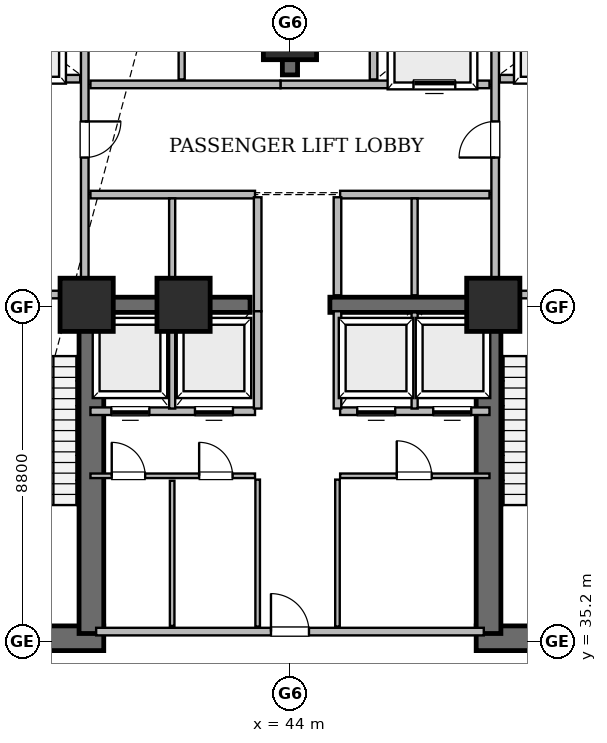
"""IFC4 building model, lengths in metres.
Left out: names, types, materials, properties, quantities, classifications, styles, units other than length and angle.
Written with IfcOpenShell. Run it as: python <this file> out.ifc"""

import sys

from ifc_helpers import new_model, si_unit, direction, frame, frame_2d, origin, origin_2d, place, context, subcontext, project, spatial, rectangle, extrude, element, fill, save


model = new_model("IFC4")
c1 = context("Model", 3, precision=1e-05, world=origin(), true_north=direction((0.0, 1.0)))
c2 = subcontext(c1, "Body", "Model", "MODEL_VIEW")
j1 = project(units=[si_unit("LENGTHUNIT", "METRE"), si_unit("PLANEANGLEUNIT", "RADIAN")], contexts=[c1])
p1 = place(None, origin())
s1 = spatial("IfcSite", under=j1, at=p1, CompositionType="ELEMENT")
p2 = place(p1, origin())
s2 = spatial("IfcBuilding", under=s1, at=p2, CompositionType="ELEMENT")
p3 = place(p2, frame((0.0, 0.0, 24.0)))
s3 = spatial("IfcBuildingStorey", under=s2, at=p3, CompositionType="ELEMENT", Elevation=24.0)
for number, where, z_axis, x_axis in (
    (1, (34.95, 35.275, 0.0), (0.0, 0.0, 1.0), (1.0, 0.0, 0.0)),
    (2, (48.9, 35.275, 0.0), (0.0, 0.0, 1.0), (1.0, 0.0, 0.0)),
):
    element("IfcWall", number, at=place(p3, frame(where, z_axis=z_axis, x_axis=x_axis)), inside=s3, PredefinedType="SHEAR", context=c2, shape_type="SweptSolid", body=[
        extrude(rectangle(XDim=4.15, YDim=0.65, at=frame_2d((2.075, 0.0))), origin(), (0.0, 0.0, 1.0), 4.925),
    ])
for number, where, z_axis, x_axis in (
    (3, (38.775, 35.4, 0.0), (0.0, 0.0, 1.0), (0.0, 1.0, 0.0)),
    (4, (49.225, 35.4, 0.0), (0.0, 0.0, 1.0), (0.0, 1.0, 0.0)),
):
    element("IfcWall", number, at=place(p3, frame(where, z_axis=z_axis, x_axis=x_axis)), inside=s3, PredefinedType="SHEAR", context=c2, shape_type="SweptSolid", body=[
        extrude(rectangle(XDim=8.95, YDim=0.65, at=frame_2d((4.475, 0.0))), origin(), (0.0, 0.0, 1.0), 4.925),
    ])
p4 = place(p3, frame((44.0, 50.1, 0.0), z_axis=(0.0, 0.0, 1.0), x_axis=(0.0, 1.0, 0.0)))
e5 = element("IfcWall", 5, at=p4, inside=s3, PredefinedType="SHEAR", context=c2, shape_type="SweptSolid", body=[
    extrude(rectangle(XDim=2.1, YDim=0.4, at=frame_2d((1.05, 0.0))), origin(), (0.0, 0.0, 1.0), 4.925),
])
for number, where, z_axis, x_axis in (
    (6, (38.75, 44.05, 0.0), (0.0, 0.0, 1.0), (1.0, 0.0, 0.0)),
    (7, (45.05, 44.05, 0.0), (0.0, 0.0, 1.0), (1.0, 0.0, 0.0)),
):
    element("IfcWall", number, at=place(p3, frame(where, z_axis=z_axis, x_axis=x_axis)), inside=s3, PredefinedType="SHEAR", context=c2, shape_type="SweptSolid", body=[
        extrude(rectangle(XDim=4.2, YDim=0.4, at=frame_2d((2.1, 0.0))), origin(), (0.0, 0.0, 1.0), 4.925),
    ])
for number, where, z_axis, x_axis in (
    (8, (38.65, 44.05, 0.0), (0.0, 0.0, 1.0), (1.0, 0.0, 0.0)),
    (9, (49.35, 44.05, 0.0), (0.0, 0.0, 1.0), (1.0, 0.0, 0.0)),
    (10, (44.0, 51.2, 0.0), (0.0, 0.0, 1.0), (1.0, 0.0, 0.0)),
    (11, (41.2, 44.05, 0.0), (0.0, 0.0, 1.0), (1.0, 0.0, 0.0)),
):
    element("IfcColumn", number, at=place(p3, frame(where, z_axis=z_axis, x_axis=x_axis)), inside=s3, PredefinedType="COLUMN", context=c2, shape_type="SweptSolid", body=[
        extrude(rectangle(XDim=1.4, YDim=1.4, at=origin_2d()), origin(), (0.0, 0.0, 1.0), 5.2),
    ])
p5 = place(p3, frame((38.9, 35.45, 0.0), z_axis=(0.0, 0.0, 1.0), x_axis=(1.0, 0.0, 0.0)))
e12 = element("IfcWall", 12, at=p5, inside=s3, PredefinedType="SOLIDWALL", context=c2, shape_type="SweptSolid", body=[
    extrude(rectangle(XDim=10.2, YDim=0.2, at=frame_2d((5.1, 0.0))), origin(), (0.0, 0.0, 1.0), 4.925),
])
p6 = place(p5, frame((4.6, 0.0, 0.0)))
e13 = element("IfcOpeningElement", 13, at=p6, cuts=e12, PredefinedType="OPENING", context=c2, shape_type="SweptSolid", body=[
    extrude(rectangle(XDim=1.0, YDim=2.15, at=frame_2d((0.5, 1.075))), frame((0.0, 0.11, 0.0), z_axis=(0.0, -1.0, 0.0), x_axis=(1.0, 0.0, 0.0)), (0.0, 0.0, 1.0), 0.22),
])
p7 = place(p3, frame((38.6, 44.5, 0.0), z_axis=(0.0, 0.0, 1.0), x_axis=(0.0, 1.0, 0.0)))
e14 = element("IfcWall", 14, at=p7, inside=s3, PredefinedType="SOLIDWALL", context=c2, shape_type="SweptSolid", body=[
    extrude(rectangle(XDim=7.92, YDim=0.2, at=frame_2d((3.96, 0.0))), origin(), (0.0, 0.0, 1.0), 4.925),
])
p8 = place(p7, frame((3.425, 0.0, 0.0)))
e15 = element("IfcOpeningElement", 15, at=p8, cuts=e14, PredefinedType="OPENING", context=c2, shape_type="SweptSolid", body=[
    extrude(rectangle(XDim=0.95, YDim=2.15, at=frame_2d((0.475, 1.075))), frame((0.0, 0.11, 0.0), z_axis=(0.0, -1.0, 0.0), x_axis=(1.0, 0.0, 0.0)), (0.0, 0.0, 1.0), 0.22),
])
p9 = place(p3, frame((49.4, 44.5, 0.0), z_axis=(0.0, 0.0, 1.0), x_axis=(0.0, 1.0, 0.0)))
e16 = element("IfcWall", 16, at=p9, inside=s3, PredefinedType="SOLIDWALL", context=c2, shape_type="SweptSolid", body=[
    extrude(rectangle(XDim=7.92, YDim=0.2, at=frame_2d((3.96, 0.0))), origin(), (0.0, 0.0, 1.0), 4.013),
])
p10 = place(p9, frame((3.425, 0.0, 0.0)))
e17 = element("IfcOpeningElement", 17, at=p10, cuts=e16, PredefinedType="OPENING", context=c2, shape_type="SweptSolid", body=[
    extrude(rectangle(XDim=0.95, YDim=2.15, at=frame_2d((0.475, 1.075))), frame((0.0, 0.11, 0.0), z_axis=(0.0, -1.0, 0.0), x_axis=(1.0, 0.0, 0.0)), (0.0, 0.0, 1.0), 0.22),
])
p11 = place(p3, frame((43.75, 49.85, 0.0), z_axis=(0.0, 0.0, 1.0), x_axis=(1.0, 0.0, 0.0)))
e18 = element("IfcWall", 18, at=p11, inside=s3, PredefinedType="SOLIDWALL", context=c2, shape_type="SweptSolid", body=[
    extrude(rectangle(XDim=5.5, YDim=0.2, at=frame_2d((2.75, 0.0))), origin(), (0.0, 0.0, 1.0), 4.013),
])
p12 = place(p11, frame((3.5, 0.0, 0.0)))
e19 = element("IfcOpeningElement", 19, at=p12, cuts=e18, PredefinedType="OPENING", context=c2, shape_type="SweptSolid", body=[
    extrude(rectangle(XDim=1.1, YDim=2.15, at=frame_2d((0.55, 1.075))), frame((0.0, 0.11, 0.0), z_axis=(0.0, -1.0, 0.0), x_axis=(1.0, 0.0, 0.0)), (0.0, 0.0, 1.0), 0.22),
])
p13 = place(p3, frame((38.75, 41.25, 0.0), z_axis=(0.0, 0.0, 1.0), x_axis=(1.0, 0.0, 0.0)))
e20 = element("IfcWall", 20, at=p13, inside=s3, PredefinedType="SOLIDWALL", context=c2, shape_type="SweptSolid", body=[
    extrude(rectangle(XDim=4.33, YDim=0.2, at=frame_2d((2.165, 0.0))), origin(), (0.0, 0.0, 1.0), 4.925),
])
p14 = place(p13, frame((0.55, 0.0, 0.0)))
e21 = element("IfcOpeningElement", 21, at=p14, cuts=e20, PredefinedType="OPENING", context=c2, shape_type="SweptSolid", body=[
    extrude(rectangle(XDim=1.0, YDim=2.15, at=frame_2d((0.5, 1.075))), frame((0.0, 0.11, 0.0), z_axis=(0.0, -1.0, 0.0), x_axis=(1.0, 0.0, 0.0)), (0.0, 0.0, 1.0), 0.22),
])
p15 = place(p13, frame((2.75, 0.0, 0.0)))
e22 = element("IfcOpeningElement", 22, at=p15, cuts=e20, PredefinedType="OPENING", context=c2, shape_type="SweptSolid", body=[
    extrude(rectangle(XDim=1.0, YDim=2.15, at=frame_2d((0.5, 1.075))), frame((0.0, 0.11, 0.0), z_axis=(0.0, -1.0, 0.0), x_axis=(1.0, 0.0, 0.0)), (0.0, 0.0, 1.0), 0.22),
])
p16 = place(p3, frame((38.75, 39.55, 0.0), z_axis=(0.0, 0.0, 1.0), x_axis=(1.0, 0.0, 0.0)))
e23 = element("IfcWall", 23, at=p16, inside=s3, PredefinedType="PARTITIONING", context=c2, shape_type="SweptSolid", body=[
    extrude(rectangle(XDim=4.33, YDim=0.12, at=frame_2d((2.165, 0.0))), origin(), (0.0, 0.0, 1.0), 4.925),
])
p17 = place(p16, frame((0.56, 0.0, 0.0)))
e24 = element("IfcOpeningElement", 24, at=p17, cuts=e23, PredefinedType="OPENING", context=c2, shape_type="SweptSolid", body=[
    extrude(rectangle(XDim=0.88, YDim=2.1, at=frame_2d((0.44, 1.05))), frame((0.0, 0.07, 0.0), z_axis=(0.0, -1.0, 0.0), x_axis=(1.0, 0.0, 0.0)), (0.0, 0.0, 1.0), 0.14),
])
p18 = place(p16, frame((2.86, 0.0, 0.0)))
e25 = element("IfcOpeningElement", 25, at=p18, cuts=e23, PredefinedType="OPENING", context=c2, shape_type="SweptSolid", body=[
    extrude(rectangle(XDim=0.88, YDim=2.1, at=frame_2d((0.44, 1.05))), frame((0.0, 0.07, 0.0), z_axis=(0.0, -1.0, 0.0), x_axis=(1.0, 0.0, 0.0)), (0.0, 0.0, 1.0), 0.14),
])
p19 = place(p3, frame((45.32, 41.25, 0.0), z_axis=(0.0, 0.0, 1.0), x_axis=(1.0, 0.0, 0.0)))
e26 = element("IfcWall", 26, at=p19, inside=s3, PredefinedType="SOLIDWALL", context=c2, shape_type="SweptSolid", body=[
    extrude(rectangle(XDim=3.93, YDim=0.2, at=frame_2d((1.965, 0.0))), origin(), (0.0, 0.0, 1.0), 4.925),
])
p20 = place(p19, frame((0.45, 0.0, 0.0)))
e27 = element("IfcOpeningElement", 27, at=p20, cuts=e26, PredefinedType="OPENING", context=c2, shape_type="SweptSolid", body=[
    extrude(rectangle(XDim=1.0, YDim=2.15, at=frame_2d((0.5, 1.075))), frame((0.0, 0.11, 0.0), z_axis=(0.0, -1.0, 0.0), x_axis=(1.0, 0.0, 0.0)), (0.0, 0.0, 1.0), 0.22),
])
p21 = place(p19, frame((2.45, 0.0, 0.0)))
e28 = element("IfcOpeningElement", 28, at=p21, cuts=e26, PredefinedType="OPENING", context=c2, shape_type="SweptSolid", body=[
    extrude(rectangle(XDim=1.0, YDim=2.15, at=frame_2d((0.5, 1.075))), frame((0.0, 0.11, 0.0), z_axis=(0.0, -1.0, 0.0), x_axis=(1.0, 0.0, 0.0)), (0.0, 0.0, 1.0), 0.22),
])
p22 = place(p3, frame((45.32, 39.55, 0.0), z_axis=(0.0, 0.0, 1.0), x_axis=(1.0, 0.0, 0.0)))
e29 = element("IfcWall", 29, at=p22, inside=s3, PredefinedType="PARTITIONING", context=c2, shape_type="SweptSolid", body=[
    extrude(rectangle(XDim=3.93, YDim=0.12, at=frame_2d((1.965, 0.0))), origin(), (0.0, 0.0, 1.0), 4.925),
])
p23 = place(p22, frame((1.49, 0.0, 0.0)))
e30 = element("IfcOpeningElement", 30, at=p23, cuts=e29, PredefinedType="OPENING", context=c2, shape_type="SweptSolid", body=[
    extrude(rectangle(XDim=0.92, YDim=2.1, at=frame_2d((0.46, 1.05))), frame((0.0, 0.07, 0.0), z_axis=(0.0, -1.0, 0.0), x_axis=(1.0, 0.0, 0.0)), (0.0, 0.0, 1.0), 0.14),
])
p24 = place(p3, frame((35.65, 44.32, 0.0), z_axis=(0.0, 0.0, 1.0), x_axis=(1.0, 0.0, 0.0)))
e31 = element("IfcWall", 31, at=p24, inside=s3, PredefinedType="SOLIDWALL", context=c2, shape_type="SweptSolid", body=[
    extrude(rectangle(XDim=2.8, YDim=0.2, at=frame_2d((1.4, 0.0))), origin(), (0.0, 0.0, 1.0), 4.925),
])
p25 = place(p24, frame((0.9, 0.0, 0.0)))
e32 = element("IfcOpeningElement", 32, at=p25, cuts=e31, PredefinedType="OPENING", context=c2, shape_type="SweptSolid", body=[
    extrude(rectangle(XDim=1.0, YDim=2.15, at=frame_2d((0.5, 1.075))), frame((0.0, 0.11, 0.0), z_axis=(0.0, -1.0, 0.0), x_axis=(1.0, 0.0, 0.0)), (0.0, 0.0, 1.0), 0.22),
])
p26 = place(p3, frame((49.55, 44.32, 0.0), z_axis=(0.0, 0.0, 1.0), x_axis=(1.0, 0.0, 0.0)))
e33 = element("IfcWall", 33, at=p26, inside=s3, PredefinedType="SOLIDWALL", context=c2, shape_type="SweptSolid", body=[
    extrude(rectangle(XDim=2.8, YDim=0.2, at=frame_2d((1.4, 0.0))), origin(), (0.0, 0.0, 1.0), 4.013),
])
p27 = place(p26, frame((0.9, 0.0, 0.0)))
e34 = element("IfcOpeningElement", 34, at=p27, cuts=e33, PredefinedType="OPENING", context=c2, shape_type="SweptSolid", body=[
    extrude(rectangle(XDim=1.0, YDim=2.15, at=frame_2d((0.5, 1.075))), frame((0.0, 0.11, 0.0), z_axis=(0.0, -1.0, 0.0), x_axis=(1.0, 0.0, 0.0)), (0.0, 0.0, 1.0), 0.22),
])
p28 = place(p3, frame((35.68, 50.0, 0.0), z_axis=(0.0, 0.0, 1.0), x_axis=(1.0, 0.0, 0.0)))
e35 = element("IfcWall", 35, at=p28, inside=s3, PredefinedType="SOLIDWALL", context=c2, shape_type="SweptSolid", body=[
    extrude(rectangle(XDim=2.8, YDim=0.2, at=frame_2d((1.4, 0.0))), origin(), (0.0, 0.0, 1.0), 4.925),
])
p29 = place(p28, frame((0.85, 0.0, 0.0)))
e36 = element("IfcOpeningElement", 36, at=p29, cuts=e35, PredefinedType="OPENING", context=c2, shape_type="SweptSolid", body=[
    extrude(rectangle(XDim=1.1, YDim=2.15, at=frame_2d((0.55, 1.075))), frame((0.0, 0.11, 0.0), z_axis=(0.0, -1.0, 0.0), x_axis=(1.0, 0.0, 0.0)), (0.0, 0.0, 1.0), 0.22),
])
p30 = place(p3, frame((49.52, 50.0, 0.0), z_axis=(0.0, 0.0, 1.0), x_axis=(1.0, 0.0, 0.0)))
e37 = element("IfcWall", 37, at=p30, inside=s3, PredefinedType="SOLIDWALL", context=c2, shape_type="SweptSolid", body=[
    extrude(rectangle(XDim=2.8, YDim=0.2, at=frame_2d((1.4, 0.0))), origin(), (0.0, 0.0, 1.0), 4.925),
])
p31 = place(p30, frame((0.85, 0.0, 0.0)))
e38 = element("IfcOpeningElement", 38, at=p31, cuts=e37, PredefinedType="OPENING", context=c2, shape_type="SweptSolid", body=[
    extrude(rectangle(XDim=1.1, YDim=2.15, at=frame_2d((0.55, 1.075))), frame((0.0, 0.11, 0.0), z_axis=(0.0, -1.0, 0.0), x_axis=(1.0, 0.0, 0.0)), (0.0, 0.0, 1.0), 0.22),
])
p32 = place(p3, frame((38.75, 49.85, 0.0), z_axis=(0.0, 0.0, 1.0), x_axis=(1.0, 0.0, 0.0)))
e39 = element("IfcWall", 39, at=p32, inside=s3, PredefinedType="SOLIDWALL", context=c2, shape_type="SweptSolid", body=[
    extrude(rectangle(XDim=5.0, YDim=0.2, at=frame_2d((2.5, 0.0))), origin(), (0.0, 0.0, 1.0), 4.925),
])
p33 = place(p3, frame((38.75, 46.95, 0.0), z_axis=(0.0, 0.0, 1.0), x_axis=(1.0, 0.0, 0.0)))
e40 = element("IfcWall", 40, at=p33, inside=s3, PredefinedType="SOLIDWALL", context=c2, shape_type="SweptSolid", body=[
    extrude(rectangle(XDim=4.33, YDim=0.2, at=frame_2d((2.165, 0.0))), origin(), (0.0, 0.0, 1.0), 4.925),
])
p34 = place(p3, frame((45.32, 46.95, 0.0), z_axis=(0.0, 0.0, 1.0), x_axis=(1.0, 0.0, 0.0)))
e41 = element("IfcWall", 41, at=p34, inside=s3, PredefinedType="SOLIDWALL", context=c2, shape_type="SweptSolid", body=[
    extrude(rectangle(XDim=3.93, YDim=0.2, at=frame_2d((1.965, 0.0))), origin(), (0.0, 0.0, 1.0), 4.013),
])
for number, where, z_axis, x_axis in (
    (42, (43.15, 35.58, 0.0), (0.0, 0.0, 1.0), (0.0, 1.0, 0.0)),
    (43, (45.25, 35.58, 0.0), (0.0, 0.0, 1.0), (0.0, 1.0, 0.0)),
):
    element("IfcWall", number, at=place(p3, frame(where, z_axis=z_axis, x_axis=x_axis)), inside=s3, PredefinedType="PARTITIONING", context=c2, shape_type="SweptSolid", body=[
        extrude(rectangle(XDim=3.87, YDim=0.12, at=frame_2d((1.935, 0.0))), origin(), (0.0, 0.0, 1.0), 4.925),
    ])
p35 = place(p3, frame((40.9, 35.6, 0.0), z_axis=(0.0, 0.0, 1.0), x_axis=(0.0, 1.0, 0.0)))
e44 = element("IfcWall", 44, at=p35, inside=s3, PredefinedType="PARTITIONING", context=c2, shape_type="SweptSolid", body=[
    extrude(rectangle(XDim=3.82, YDim=0.12, at=frame_2d((1.91, 0.0))), origin(), (0.0, 0.0, 1.0), 4.925),
])
p36 = place(p3, frame((43.15, 43.88, 0.0), z_axis=(0.0, 0.0, 1.0), x_axis=(0.0, 1.0, 0.0)))
e45 = element("IfcWall", 45, at=p36, inside=s3, PredefinedType="SOLIDWALL", context=c2, shape_type="SweptSolid", body=[
    extrude(rectangle(XDim=3.0, YDim=0.2, at=frame_2d((1.5, 0.0))), origin(), (0.0, 0.0, 1.0), 4.925),
])
p37 = place(p3, frame((45.25, 44.3, 0.0), z_axis=(0.0, 0.0, 1.0), x_axis=(0.0, 1.0, 0.0)))
e46 = element("IfcWall", 46, at=p37, inside=s3, PredefinedType="SOLIDWALL", context=c2, shape_type="SweptSolid", body=[
    extrude(rectangle(XDim=2.58, YDim=0.2, at=frame_2d((1.29, 0.0))), origin(), (0.0, 0.0, 1.0), 4.925),
])
for number, where, z_axis, x_axis in (
    (47, (43.15, 41.32, 0.0), (0.0, 0.0, 1.0), (0.0, 1.0, 0.0)),
    (48, (45.25, 41.32, 0.0), (0.0, 0.0, 1.0), (0.0, 1.0, 0.0)),
):
    element("IfcWall", number, at=place(p3, frame(where, z_axis=z_axis, x_axis=x_axis)), inside=s3, PredefinedType="SOLIDWALL", context=c2, shape_type="SweptSolid", body=[
        extrude(rectangle(XDim=2.56, YDim=0.2, at=frame_2d((1.28, 0.0))), origin(), (0.0, 0.0, 1.0), 4.925),
    ])
p38 = place(p3, frame((40.9, 44.3, 0.0), z_axis=(0.0, 0.0, 1.0), x_axis=(0.0, 1.0, 0.0)))
e49 = element("IfcWall", 49, at=p38, inside=s3, PredefinedType="SOLIDWALL", context=c2, shape_type="SweptSolid", body=[
    extrude(rectangle(XDim=2.55, YDim=0.16, at=frame_2d((1.275, 0.0))), origin(), (0.0, 0.0, 1.0), 4.925),
])
p39 = place(p3, frame((47.28, 44.3, 0.0), z_axis=(0.0, 0.0, 1.0), x_axis=(0.0, 1.0, 0.0)))
e50 = element("IfcWall", 50, at=p39, inside=s3, PredefinedType="SOLIDWALL", context=c2, shape_type="SweptSolid", body=[
    extrude(rectangle(XDim=2.55, YDim=0.16, at=frame_2d((1.275, 0.0))), origin(), (0.0, 0.0, 1.0), 4.013),
])
for number, where, z_axis, x_axis in (
    (51, (40.9, 41.32, 0.0), (0.0, 0.0, 1.0), (0.0, 1.0, 0.0)),
    (52, (47.28, 41.32, 0.0), (0.0, 0.0, 1.0), (0.0, 1.0, 0.0)),
):
    element("IfcWall", number, at=place(p3, frame(where, z_axis=z_axis, x_axis=x_axis)), inside=s3, PredefinedType="SOLIDWALL", context=c2, shape_type="SweptSolid", body=[
        extrude(rectangle(XDim=2.53, YDim=0.16, at=frame_2d((1.265, 0.0))), origin(), (0.0, 0.0, 1.0), 4.925),
    ])
p40 = place(p3, frame((41.15, 49.98, 0.0), z_axis=(0.0, 0.0, 1.0), x_axis=(0.0, 1.0, 0.0)))
e53 = element("IfcWall", 53, at=p40, inside=s3, PredefinedType="SOLIDWALL", context=c2, shape_type="SweptSolid", body=[
    extrude(rectangle(XDim=2.37, YDim=0.16, at=frame_2d((1.185, 0.0))), origin(), (0.0, 0.0, 1.0), 4.925),
])
p41 = place(p3, frame((46.2, 49.98, 0.0), z_axis=(0.0, 0.0, 1.0), x_axis=(0.0, 1.0, 0.0)))
e54 = element("IfcWall", 54, at=p41, inside=s3, PredefinedType="SOLIDWALL", context=c2, shape_type="SweptSolid", body=[
    extrude(rectangle(XDim=2.37, YDim=0.2, at=frame_2d((1.185, 0.0))), origin(), (0.0, 0.0, 1.0), 4.925),
])
p42 = place(p8, frame((0.95, 0.0, 0.0), z_axis=(0.0, 0.0, 1.0), x_axis=(-1.0, 0.0, 0.0)))
e55 = element("IfcDoor", 55, at=p42, inside=s3, OperationType="SINGLE_SWING_RIGHT", PredefinedType="DOOR", context=c2, shape_type="SweptSolid", body=[
    extrude(rectangle(XDim=0.95, YDim=2.15, at=frame_2d((0.475, 1.075))), frame((0.0, 0.025, 0.0), z_axis=(0.0, -1.0, 0.0), x_axis=(1.0, 0.0, 0.0)), (0.0, 0.0, 1.0), 0.05),
])
fill(e15, e55)
p43 = place(p10, origin())
e56 = element("IfcDoor", 56, at=p43, inside=s3, OperationType="SINGLE_SWING_LEFT", PredefinedType="DOOR", context=c2, shape_type="SweptSolid", body=[
    extrude(rectangle(XDim=0.95, YDim=2.15, at=frame_2d((0.475, 1.075))), frame((0.0, 0.025, 0.0), z_axis=(0.0, -1.0, 0.0), x_axis=(1.0, 0.0, 0.0)), (0.0, 0.0, 1.0), 0.05),
])
fill(e17, e56)
p44 = place(p6, origin())
e57 = element("IfcDoor", 57, at=p44, inside=s3, OperationType="SINGLE_SWING_LEFT", PredefinedType="DOOR", context=c2, shape_type="SweptSolid", body=[
    extrude(rectangle(XDim=1.0, YDim=2.15, at=frame_2d((0.5, 1.075))), frame((0.0, 0.025, 0.0), z_axis=(0.0, -1.0, 0.0), x_axis=(1.0, 0.0, 0.0)), (0.0, 0.0, 1.0), 0.05),
])
fill(e13, e57)
p45 = place(p12, origin())
e58 = element("IfcDoor", 58, at=p45, inside=s3, OperationType="SLIDING_TO_LEFT", PredefinedType="DOOR", context=c2, shape_type="SweptSolid", body=[
    extrude(rectangle(XDim=1.1, YDim=2.15, at=frame_2d((0.55, 1.075))), frame((0.0, 0.025, 0.0), z_axis=(0.0, -1.0, 0.0), x_axis=(1.0, 0.0, 0.0)), (0.0, 0.0, 1.0), 0.05),
])
fill(e19, e58)
p46 = place(p14, frame((1.0, 0.0, 0.0), z_axis=(0.0, 0.0, 1.0), x_axis=(-1.0, 0.0, 0.0)))
e59 = element("IfcDoor", 59, at=p46, inside=s3, OperationType="SLIDING_TO_LEFT", PredefinedType="DOOR", context=c2, shape_type="SweptSolid", body=[
    extrude(rectangle(XDim=1.0, YDim=2.15, at=frame_2d((0.5, 1.075))), frame((0.0, 0.025, 0.0), z_axis=(0.0, -1.0, 0.0), x_axis=(1.0, 0.0, 0.0)), (0.0, 0.0, 1.0), 0.05),
])
fill(e21, e59)
p47 = place(p15, frame((1.0, 0.0, 0.0), z_axis=(0.0, 0.0, 1.0), x_axis=(-1.0, 0.0, 0.0)))
e60 = element("IfcDoor", 60, at=p47, inside=s3, OperationType="SLIDING_TO_LEFT", PredefinedType="DOOR", context=c2, shape_type="SweptSolid", body=[
    extrude(rectangle(XDim=1.0, YDim=2.15, at=frame_2d((0.5, 1.075))), frame((0.0, 0.025, 0.0), z_axis=(0.0, -1.0, 0.0), x_axis=(1.0, 0.0, 0.0)), (0.0, 0.0, 1.0), 0.05),
])
fill(e22, e60)
p48 = place(p20, frame((1.0, 0.0, 0.0), z_axis=(0.0, 0.0, 1.0), x_axis=(-1.0, 0.0, 0.0)))
e61 = element("IfcDoor", 61, at=p48, inside=s3, OperationType="SLIDING_TO_LEFT", PredefinedType="DOOR", context=c2, shape_type="SweptSolid", body=[
    extrude(rectangle(XDim=1.0, YDim=2.15, at=frame_2d((0.5, 1.075))), frame((0.0, 0.025, 0.0), z_axis=(0.0, -1.0, 0.0), x_axis=(1.0, 0.0, 0.0)), (0.0, 0.0, 1.0), 0.05),
])
fill(e27, e61)
p49 = place(p21, frame((1.0, 0.0, 0.0), z_axis=(0.0, 0.0, 1.0), x_axis=(-1.0, 0.0, 0.0)))
e62 = element("IfcDoor", 62, at=p49, inside=s3, OperationType="SLIDING_TO_LEFT", PredefinedType="DOOR", context=c2, shape_type="SweptSolid", body=[
    extrude(rectangle(XDim=1.0, YDim=2.15, at=frame_2d((0.5, 1.075))), frame((0.0, 0.025, 0.0), z_axis=(0.0, -1.0, 0.0), x_axis=(1.0, 0.0, 0.0)), (0.0, 0.0, 1.0), 0.05),
])
fill(e28, e62)
p50 = place(p17, origin())
e63 = element("IfcDoor", 63, at=p50, inside=s3, OperationType="SINGLE_SWING_LEFT", PredefinedType="DOOR", context=c2, shape_type="SweptSolid", body=[
    extrude(rectangle(XDim=0.88, YDim=2.1, at=frame_2d((0.44, 1.05))), frame((0.0, 0.025, 0.0), z_axis=(0.0, -1.0, 0.0), x_axis=(1.0, 0.0, 0.0)), (0.0, 0.0, 1.0), 0.05),
])
fill(e24, e63)
p51 = place(p18, origin())
e64 = element("IfcDoor", 64, at=p51, inside=s3, OperationType="SINGLE_SWING_LEFT", PredefinedType="DOOR", context=c2, shape_type="SweptSolid", body=[
    extrude(rectangle(XDim=0.88, YDim=2.1, at=frame_2d((0.44, 1.05))), frame((0.0, 0.025, 0.0), z_axis=(0.0, -1.0, 0.0), x_axis=(1.0, 0.0, 0.0)), (0.0, 0.0, 1.0), 0.05),
])
fill(e25, e64)
p52 = place(p23, origin())
e65 = element("IfcDoor", 65, at=p52, inside=s3, OperationType="SINGLE_SWING_LEFT", PredefinedType="DOOR", context=c2, shape_type="SweptSolid", body=[
    extrude(rectangle(XDim=0.92, YDim=2.1, at=frame_2d((0.46, 1.05))), frame((0.0, 0.025, 0.0), z_axis=(0.0, -1.0, 0.0), x_axis=(1.0, 0.0, 0.0)), (0.0, 0.0, 1.0), 0.05),
])
fill(e30, e65)
save(model, sys.argv[1])
